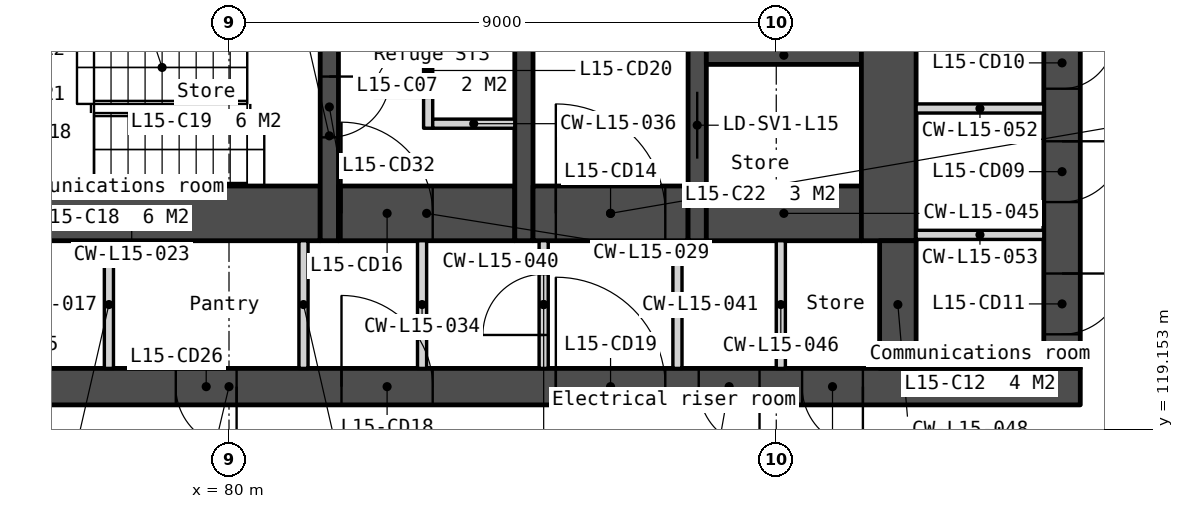
"""IFC4 building model, lengths in metres.
Left out: names, types, materials, properties, quantities, classifications, styles, units other than length and angle.
Written with IfcOpenShell. Run it as: python <this file> out.ifc"""

import sys

from ifc_helpers import new_model, si_unit, direction, frame, frame_2d, origin, place, context, subcontext, project, spatial, polyline, rectangle, outline, extrude, element, fill, save


model = new_model("IFC4")
c1 = context("Model", 3, precision=1e-05, world=origin(), true_north=direction((0.0, 1.0)))
c2 = subcontext(c1, "Body", "Model", "MODEL_VIEW")
j1 = project(units=[si_unit("LENGTHUNIT", "METRE"), si_unit("PLANEANGLEUNIT", "RADIAN")], contexts=[c1])
p1 = place(None, origin())
s1 = spatial("IfcSite", under=j1, at=p1, CompositionType="ELEMENT")
p2 = place(p1, origin())
s2 = spatial("IfcBuilding", under=s1, at=p2, CompositionType="ELEMENT")
p3 = place(p2, frame((0.0, 0.0, 66.5)))
s3 = spatial("IfcBuildingStorey", under=s2, at=p3, CompositionType="ELEMENT", Elevation=66.5)
p4 = place(p3, frame((66.0, 119.85, 0.0), z_axis=(0.0, 0.0, 1.0), x_axis=(1.0, 0.0, 0.0)))
e1 = element("IfcWall", 1, at=p4, inside=s3, PredefinedType="SOLIDWALL", context=c2, shape_type="SweptSolid", body=[
    extrude(rectangle(XDim=28.0, YDim=0.6, at=frame_2d((14.0, 0.0))), origin(), (0.0, 0.0, 1.0), 3.35),
])
p5 = place(p4, frame((6.825, 0.0, 0.0)))
e2 = element("IfcOpeningElement", 2, at=p5, cuts=e1, PredefinedType="OPENING", context=c2, shape_type="SweptSolid", body=[
    extrude(rectangle(XDim=1.8, YDim=2.1, at=frame_2d((0.9, 1.05))), frame((0.0, 0.31, 0.0), z_axis=(0.0, -1.0, 0.0), x_axis=(1.0, 0.0, 0.0)), (0.0, 0.0, 1.0), 0.62),
])
p6 = place(p4, frame((15.85, 0.0, 0.0)))
e3 = element("IfcOpeningElement", 3, at=p6, cuts=e1, PredefinedType="OPENING", context=c2, shape_type="SweptSolid", body=[
    extrude(rectangle(XDim=1.5, YDim=2.1, at=frame_2d((0.75, 1.05))), frame((0.0, 0.31, 0.0), z_axis=(0.0, -1.0, 0.0), x_axis=(1.0, 0.0, 0.0)), (0.0, 0.0, 1.0), 0.62),
])
p7 = place(p4, frame((19.375, 0.0, 0.0)))
e4 = element("IfcOpeningElement", 4, at=p7, cuts=e1, PredefinedType="OPENING", context=c2, shape_type="SweptSolid", body=[
    extrude(rectangle(XDim=1.8, YDim=2.1, at=frame_2d((0.9, 1.05))), frame((0.0, 0.31, 0.0), z_axis=(0.0, -1.0, 0.0), x_axis=(1.0, 0.0, 0.0)), (0.0, 0.0, 1.0), 0.62),
])
p8 = place(p4, frame((4.425, 0.0, 0.0)))
e5 = element("IfcOpeningElement", 5, at=p8, cuts=e1, PredefinedType="OPENING", context=c2, shape_type="SweptSolid", body=[
    extrude(rectangle(XDim=1.0, YDim=2.1, at=frame_2d((0.5, 1.05))), frame((0.0, 0.31, 0.0), z_axis=(0.0, -1.0, 0.0), x_axis=(1.0, 0.0, 0.0)), (0.0, 0.0, 1.0), 0.62),
])
p9 = place(p4, frame((9.925, 0.0, 0.0)))
e6 = element("IfcOpeningElement", 6, at=p9, cuts=e1, PredefinedType="OPENING", context=c2, shape_type="SweptSolid", body=[
    extrude(rectangle(XDim=1.0, YDim=2.1, at=frame_2d((0.5, 1.05))), frame((0.0, 0.31, 0.0), z_axis=(0.0, -1.0, 0.0), x_axis=(1.0, 0.0, 0.0)), (0.0, 0.0, 1.0), 0.62),
])
p10 = place(p4, frame((13.125, 0.0, 0.0)))
e7 = element("IfcOpeningElement", 7, at=p10, cuts=e1, PredefinedType="OPENING", context=c2, shape_type="SweptSolid", body=[
    extrude(rectangle(XDim=1.0, YDim=2.1, at=frame_2d((0.5, 1.05))), frame((0.0, 0.31, 0.0), z_axis=(0.0, -1.0, 0.0), x_axis=(1.0, 0.0, 0.0)), (0.0, 0.0, 1.0), 0.62),
])
p11 = place(p4, frame((21.725, 0.0, 0.0)))
e8 = element("IfcOpeningElement", 8, at=p11, cuts=e1, PredefinedType="OPENING", context=c2, shape_type="SweptSolid", body=[
    extrude(rectangle(XDim=1.0, YDim=2.1, at=frame_2d((0.5, 1.05))), frame((0.0, 0.31, 0.0), z_axis=(0.0, -1.0, 0.0), x_axis=(1.0, 0.0, 0.0)), (0.0, 0.0, 1.0), 0.62),
])
p12 = place(p4, frame((23.425, 0.0, 0.0)))
e9 = element("IfcOpeningElement", 9, at=p12, cuts=e1, PredefinedType="OPENING", context=c2, shape_type="SweptSolid", body=[
    extrude(rectangle(XDim=1.0, YDim=2.1, at=frame_2d((0.5, 1.05))), frame((0.0, 0.31, 0.0), z_axis=(0.0, -1.0, 0.0), x_axis=(1.0, 0.0, 0.0)), (0.0, 0.0, 1.0), 0.62),
])
p13 = place(p3, frame((75.3, 122.7, 0.0), z_axis=(0.0, 0.0, 1.0), x_axis=(1.0, 0.0, 0.0)))
e10 = element("IfcWall", 10, at=p13, inside=s3, PredefinedType="SOLIDWALL", context=c2, shape_type="SweptSolid", body=[
    extrude(rectangle(XDim=6.2, YDim=0.9, at=frame_2d((3.1, 0.0))), origin(), (0.0, 0.0, 1.0), 3.35),
])
for number, where, z_axis, x_axis in (
    (11, (78.025, 122.25, 0.0), (0.0, 0.0, 1.0), (0.0, -1.0, 0.0)),
    (12, (81.225, 122.25, 0.0), (0.0, 0.0, 1.0), (0.0, -1.0, 0.0)),
):
    element("IfcWall", number, at=place(p3, frame(where, z_axis=z_axis, x_axis=x_axis)), inside=s3, PredefinedType="PARTITIONING", context=c2, shape_type="SweptSolid", body=[
        extrude(rectangle(XDim=2.1, YDim=0.15, at=frame_2d((1.05, 0.0))), origin(), (0.0, 0.0, 1.0), 3.35),
    ])
p14 = place(p3, frame((81.65, 125.7, 0.0), z_axis=(0.0, 0.0, 1.0), x_axis=(0.0, -1.0, 0.0)))
e13 = element("IfcWall", 13, at=p14, inside=s3, PredefinedType="SOLIDWALL", context=c2, shape_type="SweptSolid", body=[
    extrude(rectangle(XDim=3.45, YDim=0.3, at=frame_2d((1.725, 0.0))), origin(), (0.0, 0.0, 1.0), 3.35),
])
p15 = place(p14, frame((0.75, 0.0, 0.0)))
e14 = element("IfcOpeningElement", 14, at=p15, cuts=e13, PredefinedType="OPENING", context=c2, shape_type="SweptSolid", body=[
    extrude(rectangle(XDim=1.0, YDim=2.1, at=frame_2d((0.5, 1.05))), frame((0.0, 0.16, 0.0), z_axis=(0.0, -1.0, 0.0), x_axis=(1.0, 0.0, 0.0)), (0.0, 0.0, 1.0), 0.32),
])
p16 = place(p3, frame((81.8, 122.7, 0.0), z_axis=(0.0, 0.0, 1.0), x_axis=(1.0, 0.0, 0.0)))
e15 = element("IfcWall", 15, at=p16, inside=s3, PredefinedType="SOLIDWALL", context=c2, shape_type="SweptSolid", body=[
    extrude(rectangle(XDim=2.9, YDim=0.9, at=frame_2d((1.45, 0.0))), origin(), (0.0, 0.0, 1.0), 3.35),
])
p17 = place(p16, frame((0.05, 0.0, 0.0)))
e16 = element("IfcOpeningElement", 16, at=p17, cuts=e15, PredefinedType="OPENING", context=c2, shape_type="SweptSolid", body=[
    extrude(rectangle(XDim=1.5, YDim=2.1, at=frame_2d((0.75, 1.05))), frame((0.0, 0.46, 0.0), z_axis=(0.0, -1.0, 0.0), x_axis=(1.0, 0.0, 0.0)), (0.0, 0.0, 1.0), 0.92),
])
p18 = place(p3, frame((83.175, 122.25, 0.0), z_axis=(0.0, 0.0, 1.0), x_axis=(0.0, -1.0, 0.0)))
e17 = element("IfcWall", 17, at=p18, inside=s3, PredefinedType="PARTITIONING", context=c2, shape_type="SweptSolid", body=[
    extrude(rectangle(XDim=2.1, YDim=0.15, at=frame_2d((1.05, 0.0))), origin(), (0.0, 0.0, 1.0), 3.35),
])
p19 = place(p3, frame((83.275, 125.85, 0.0), z_axis=(0.0, 0.0, 1.0), x_axis=(0.0, -1.0, 0.0)))
e18 = element("IfcWall", 18, at=p19, inside=s3, PredefinedType="PARTITIONING", context=c2, shape_type="SweptSolid", body=[
    extrude(rectangle(XDim=1.75, YDim=0.15, at=frame_2d((0.875, 0.0))), origin(), (0.0, 0.0, 1.0), 3.35),
])
p20 = place(p19, frame((0.35, 0.0, 0.0)))
e19 = element("IfcOpeningElement", 19, at=p20, cuts=e18, PredefinedType="OPENING", context=c2, shape_type="SweptSolid", body=[
    extrude(rectangle(XDim=0.9, YDim=2.1, at=frame_2d((0.45, 1.05))), frame((0.0, 0.085, 0.0), z_axis=(0.0, -1.0, 0.0), x_axis=(1.0, 0.0, 0.0)), (0.0, 0.0, 1.0), 0.17),
])
p21 = place(p3, frame((83.35, 124.175, 0.0), z_axis=(0.0, 0.0, 1.0), x_axis=(1.0, 0.0, 0.0)))
e20 = element("IfcWall", 20, at=p21, inside=s3, PredefinedType="PARTITIONING", context=c2, shape_type="SweptSolid", body=[
    extrude(rectangle(XDim=1.35, YDim=0.15, at=frame_2d((0.675, 0.0))), origin(), (0.0, 0.0, 1.0), 3.35),
])
p22 = place(p3, frame((84.85, 133.95, 0.0), z_axis=(0.0, 0.0, 1.0), x_axis=(0.0, -1.0, 0.0)))
e21 = element("IfcWall", 21, at=p22, inside=s3, PredefinedType="SOLIDWALL", context=c2, shape_type="SweptSolid", body=[
    extrude(rectangle(XDim=11.7, YDim=0.3, at=frame_2d((5.85, 0.0))), origin(), (0.0, 0.0, 1.0), 3.35),
])
p23 = place(p3, frame((85.0, 122.7, 0.0), z_axis=(0.0, 0.0, 1.0), x_axis=(1.0, 0.0, 0.0)))
e22 = element("IfcWall", 22, at=p23, inside=s3, PredefinedType="SOLIDWALL", context=c2, shape_type="SweptSolid", body=[
    extrude(rectangle(XDim=2.55, YDim=0.9, at=frame_2d((1.275, 0.0))), origin(), (0.0, 0.0, 1.0), 3.35),
])
p24 = place(p23, frame((0.375, 0.0, 0.0)))
e23 = element("IfcOpeningElement", 23, at=p24, cuts=e22, PredefinedType="OPENING", context=c2, shape_type="SweptSolid", body=[
    extrude(rectangle(XDim=1.8, YDim=2.1, at=frame_2d((0.9, 1.05))), frame((0.0, 0.46, 0.0), z_axis=(0.0, -1.0, 0.0), x_axis=(1.0, 0.0, 0.0)), (0.0, 0.0, 1.0), 0.92),
])
p25 = place(p3, frame((85.175, 122.25, 0.0), z_axis=(0.0, 0.0, 1.0), x_axis=(0.0, -1.0, 0.0)))
e24 = element("IfcWall", 24, at=p25, inside=s3, PredefinedType="PARTITIONING", context=c2, shape_type="SweptSolid", body=[
    extrude(rectangle(XDim=2.1, YDim=0.15, at=frame_2d((1.05, 0.0))), origin(), (0.0, 0.0, 1.0), 3.35),
])
p26 = place(p25, frame((0.55, 0.0, 0.0)))
e25 = element("IfcOpeningElement", 25, at=p26, cuts=e24, PredefinedType="OPENING", context=c2, shape_type="SweptSolid", body=[
    extrude(rectangle(XDim=1.0, YDim=2.1, at=frame_2d((0.5, 1.05))), frame((0.0, 0.085, 0.0), z_axis=(0.0, -1.0, 0.0), x_axis=(1.0, 0.0, 0.0)), (0.0, 0.0, 1.0), 0.17),
])
p27 = place(p3, frame((87.375, 122.25, 0.0), z_axis=(0.0, 0.0, 1.0), x_axis=(0.0, -1.0, 0.0)))
e26 = element("IfcWall", 26, at=p27, inside=s3, PredefinedType="PARTITIONING", context=c2, shape_type="SweptSolid", body=[
    extrude(rectangle(XDim=2.1, YDim=0.15, at=frame_2d((1.05, 0.0))), origin(), (0.0, 0.0, 1.0), 3.35),
])
p28 = place(p3, frame((87.7, 133.95, 0.0), z_axis=(0.0, 0.0, 1.0), x_axis=(0.0, -1.0, 0.0)))
e27 = element("IfcWall", 27, at=p28, inside=s3, PredefinedType="SOLIDWALL", context=c2, shape_type="SweptSolid", body=[
    extrude(rectangle(XDim=11.7, YDim=0.3, at=frame_2d((5.85, 0.0))), origin(), (0.0, 0.0, 1.0), 3.35),
])
p29 = place(p28, frame((6.95, 0.0, 0.0)))
e28 = element("IfcOpeningElement", 28, at=p29, cuts=e27, PredefinedType="OPENING", context=c2, shape_type="SweptSolid", body=[
    extrude(rectangle(XDim=1.1, YDim=2.1, at=frame_2d((0.55, 1.05))), frame((0.0, 0.16, 0.0), z_axis=(0.0, -1.0, 0.0), x_axis=(1.0, 0.0, 0.0)), (0.0, 0.0, 1.0), 0.32),
])
p30 = place(p28, frame((5.1, 0.0, 0.0)))
e29 = element("IfcOpeningElement", 29, at=p30, cuts=e27, PredefinedType="OPENING", context=c2, shape_type="SweptSolid", body=[
    extrude(rectangle(XDim=1.0, YDim=2.1, at=frame_2d((0.5, 1.05))), frame((0.0, 0.16, 0.0), z_axis=(0.0, -1.0, 0.0), x_axis=(1.0, 0.0, 0.0)), (0.0, 0.0, 1.0), 0.32),
])
p31 = place(p28, frame((9.25, 0.0, 0.0)))
e30 = element("IfcOpeningElement", 30, at=p31, cuts=e27, PredefinedType="OPENING", context=c2, shape_type="SweptSolid", body=[
    extrude(rectangle(XDim=1.1, YDim=2.1, at=frame_2d((0.55, 1.05))), frame((0.0, 0.16, 0.0), z_axis=(0.0, -1.0, 0.0), x_axis=(1.0, 0.0, 0.0)), (0.0, 0.0, 1.0), 0.32),
])
p32 = place(p3, frame((87.85, 125.3, 0.0), z_axis=(0.0, 0.0, 1.0), x_axis=(1.0, 0.0, 0.0)))
e31 = element("IfcWall", 31, at=p32, inside=s3, PredefinedType="SOLIDWALL", context=c2, shape_type="SweptSolid", body=[
    extrude(rectangle(XDim=2.55, YDim=0.3, at=frame_2d((1.275, 0.0))), origin(), (0.0, 0.0, 1.0), 3.35),
])
p33 = place(p3, frame((87.85, 122.7, 0.0), z_axis=(0.0, 0.0, 1.0), x_axis=(1.0, 0.0, 0.0)))
e32 = element("IfcWall", 32, at=p33, inside=s3, PredefinedType="SOLIDWALL", context=c2, shape_type="SweptSolid", body=[
    extrude(rectangle(XDim=2.55, YDim=0.9, at=frame_2d((1.275, 0.0))), origin(), (0.0, 0.0, 1.0), 3.35),
])
p34 = place(p3, frame((89.075, 122.25, 0.0), z_axis=(0.0, 0.0, 1.0), x_axis=(0.0, -1.0, 0.0)))
e33 = element("IfcWall", 33, at=p34, inside=s3, PredefinedType="PARTITIONING", context=c2, shape_type="SweptSolid", body=[
    extrude(rectangle(XDim=2.1, YDim=0.15, at=frame_2d((1.05, 0.0))), origin(), (0.0, 0.0, 1.0), 3.35),
])
p35 = place(p3, frame((90.85, 133.95, 0.0), z_axis=(0.0, 0.0, 1.0), x_axis=(0.0, -1.0, 0.0)))
e34 = element("IfcWall", 34, at=p35, inside=s3, PredefinedType="SOLIDWALL", context=c2, shape_type="SweptSolid", body=[
    extrude(rectangle(XDim=11.7, YDim=0.9, at=frame_2d((5.85, 0.0))), origin(), (0.0, 0.0, 1.0), 3.35),
])
p36 = place(p3, frame((91.0, 122.25, 0.0), z_axis=(0.0, 0.0, 1.0), x_axis=(0.0, -1.0, 0.0)))
e35 = element("IfcWall", 35, at=p36, inside=s3, PredefinedType="SOLIDWALL", context=c2, shape_type="SweptSolid", body=[
    extrude(rectangle(XDim=2.1, YDim=0.6, at=frame_2d((1.05, 0.0))), origin(), (0.0, 0.0, 1.0), 3.35),
])
for number, where, z_axis, x_axis in (
    (36, (91.3, 124.425, 0.0), (0.0, 0.0, 1.0), (1.0, 0.0, 0.0)),
    (37, (91.3, 122.346, 0.0), (0.0, 0.0, 1.0), (1.0, 0.0, 0.0)),
):
    element("IfcWall", number, at=place(p3, frame(where, z_axis=z_axis, x_axis=x_axis)), inside=s3, PredefinedType="PARTITIONING", context=c2, shape_type="SweptSolid", body=[
        extrude(rectangle(XDim=2.1, YDim=0.15, at=frame_2d((1.05, 0.0))), origin(), (0.0, 0.0, 1.0), 3.35),
    ])
p37 = place(p3, frame((93.7, 133.95, 0.0), z_axis=(0.0, 0.0, 1.0), x_axis=(0.0, -1.0, 0.0)))
e38 = element("IfcWall", 38, at=p37, inside=s3, PredefinedType="SOLIDWALL", context=c2, shape_type="SweptSolid", body=[
    extrude(rectangle(XDim=13.8, YDim=0.6, at=frame_2d((6.9, 0.0))), origin(), (0.0, 0.0, 1.0), 3.35),
])
p38 = place(p37, frame((0.6, 0.0, 0.0)))
e39 = element("IfcOpeningElement", 39, at=p38, cuts=e38, PredefinedType="OPENING", context=c2, shape_type="SweptSolid", body=[
    extrude(rectangle(XDim=1.1, YDim=2.1, at=frame_2d((0.55, 1.05))), frame((0.0, 0.31, 0.0), z_axis=(0.0, -1.0, 0.0), x_axis=(1.0, 0.0, 0.0)), (0.0, 0.0, 1.0), 0.62),
])
p39 = place(p37, frame((10.064, 0.0, 0.0)))
e40 = element("IfcOpeningElement", 40, at=p39, cuts=e38, PredefinedType="OPENING", context=c2, shape_type="SweptSolid", body=[
    extrude(rectangle(XDim=1.0, YDim=2.1, at=frame_2d((0.5, 1.05))), frame((0.0, 0.31, 0.0), z_axis=(0.0, -1.0, 0.0), x_axis=(1.0, 0.0, 0.0)), (0.0, 0.0, 1.0), 0.62),
])
p40 = place(p37, frame((8.35, 0.0, 0.0)))
e41 = element("IfcOpeningElement", 41, at=p40, cuts=e38, PredefinedType="OPENING", context=c2, shape_type="SweptSolid", body=[
    extrude(rectangle(XDim=0.85, YDim=2.1, at=frame_2d((0.425, 1.05))), frame((0.0, 0.31, 0.0), z_axis=(0.0, -1.0, 0.0), x_axis=(1.0, 0.0, 0.0)), (0.0, 0.0, 1.0), 0.62),
])
p41 = place(p37, frame((12.239, 0.0, 0.0)))
e42 = element("IfcOpeningElement", 42, at=p41, cuts=e38, PredefinedType="OPENING", context=c2, shape_type="SweptSolid", body=[
    extrude(rectangle(XDim=1.0, YDim=2.1, at=frame_2d((0.5, 1.05))), frame((0.0, 0.31, 0.0), z_axis=(0.0, -1.0, 0.0), x_axis=(1.0, 0.0, 0.0)), (0.0, 0.0, 1.0), 0.62),
])
p42 = place(p3, frame((88.435, 99.831, -0.15), z_axis=(0.0, 0.0, 1.0), x_axis=(0.500000806382, 0.866024938219, 0.0)))
e43 = element("IfcWall", 43, at=p42, inside=s3, PredefinedType="SOLIDWALL", context=c2, shape_type="SweptSolid", body=[
    extrude(outline(polyline([(34.14, 3.5), (34.14, 0.0), (0.0, 0.0), (0.0, 3.5), (34.14, 3.5)])), frame((0.0, 0.225, 0.0), z_axis=(0.0, -1.0, 0.0), x_axis=(1.0, 0.0, 0.0)), (0.0, 0.0, 1.0), 0.45),
])
p43 = place(p42, frame((5.81, 0.0, 1.05)))
e44 = element("IfcOpeningElement", 44, at=p43, cuts=e43, PredefinedType="OPENING", context=c2, shape_type="SweptSolid", body=[
    extrude(rectangle(XDim=1.2, YDim=1.5, at=frame_2d((0.6, 0.75))), frame((0.0, 0.235, 0.0), z_axis=(0.0, -1.0, 0.0), x_axis=(1.0, 0.0, 0.0)), (0.0, 0.0, 1.0), 0.47),
])
p44 = place(p42, frame((7.51, 0.0, 1.05)))
e45 = element("IfcOpeningElement", 45, at=p44, cuts=e43, PredefinedType="OPENING", context=c2, shape_type="SweptSolid", body=[
    extrude(rectangle(XDim=1.2, YDim=1.5, at=frame_2d((0.6, 0.75))), frame((0.0, 0.235, 0.0), z_axis=(0.0, -1.0, 0.0), x_axis=(1.0, 0.0, 0.0)), (0.0, 0.0, 1.0), 0.47),
])
p45 = place(p42, frame((14.77, 0.0, 1.05)))
e46 = element("IfcOpeningElement", 46, at=p45, cuts=e43, PredefinedType="OPENING", context=c2, shape_type="SweptSolid", body=[
    extrude(rectangle(XDim=1.2, YDim=1.5, at=frame_2d((0.6, 0.75))), frame((0.0, 0.235, 0.0), z_axis=(0.0, -1.0, 0.0), x_axis=(1.0, 0.0, 0.0)), (0.0, 0.0, 1.0), 0.47),
])
p46 = place(p42, frame((16.47, 0.0, 1.05)))
e47 = element("IfcOpeningElement", 47, at=p46, cuts=e43, PredefinedType="OPENING", context=c2, shape_type="SweptSolid", body=[
    extrude(rectangle(XDim=1.2, YDim=1.5, at=frame_2d((0.6, 0.75))), frame((0.0, 0.235, 0.0), z_axis=(0.0, -1.0, 0.0), x_axis=(1.0, 0.0, 0.0)), (0.0, 0.0, 1.0), 0.47),
])
p47 = place(p42, frame((23.73, 0.0, 1.05)))
e48 = element("IfcOpeningElement", 48, at=p47, cuts=e43, PredefinedType="OPENING", context=c2, shape_type="SweptSolid", body=[
    extrude(rectangle(XDim=1.2, YDim=1.5, at=frame_2d((0.6, 0.75))), frame((0.0, 0.235, 0.0), z_axis=(0.0, -1.0, 0.0), x_axis=(1.0, 0.0, 0.0)), (0.0, 0.0, 1.0), 0.47),
])
p48 = place(p42, frame((25.43, 0.0, 1.05)))
e49 = element("IfcOpeningElement", 49, at=p48, cuts=e43, PredefinedType="OPENING", context=c2, shape_type="SweptSolid", body=[
    extrude(rectangle(XDim=1.2, YDim=1.5, at=frame_2d((0.6, 0.75))), frame((0.0, 0.235, 0.0), z_axis=(0.0, -1.0, 0.0), x_axis=(1.0, 0.0, 0.0)), (0.0, 0.0, 1.0), 0.47),
])
p49 = place(p42, frame((32.218, 0.0, 1.05)))
e50 = element("IfcOpeningElement", 50, at=p49, cuts=e43, PredefinedType="OPENING", context=c2, shape_type="SweptSolid", body=[
    extrude(rectangle(XDim=1.2, YDim=1.5, at=frame_2d((0.6, 0.75))), frame((0.0, 0.235, 0.0), z_axis=(0.0, -1.0, 0.0), x_axis=(1.0, 0.0, 0.0)), (0.0, 0.0, 1.0), 0.47),
])
p50 = place(p39, origin())
e51 = element("IfcDoor", 51, at=p50, inside=s3, OperationType="SINGLE_SWING_LEFT", PredefinedType="DOOR", context=c2, shape_type="SweptSolid", body=[
    extrude(rectangle(XDim=1.0, YDim=2.1, at=frame_2d((0.5, 1.05))), frame((0.0, 0.025, 0.0), z_axis=(0.0, -1.0, 0.0), x_axis=(1.0, 0.0, 0.0)), (0.0, 0.0, 1.0), 0.05),
])
fill(e40, e51)
p51 = place(p40, origin())
e52 = element("IfcDoor", 52, at=p51, inside=s3, OperationType="SINGLE_SWING_LEFT", PredefinedType="DOOR", context=c2, shape_type="SweptSolid", body=[
    extrude(rectangle(XDim=0.85, YDim=2.1, at=frame_2d((0.425, 1.05))), frame((0.0, 0.025, 0.0), z_axis=(0.0, -1.0, 0.0), x_axis=(1.0, 0.0, 0.0)), (0.0, 0.0, 1.0), 0.05),
])
fill(e41, e52)
p52 = place(p41, origin())
e53 = element("IfcDoor", 53, at=p52, inside=s3, OperationType="SINGLE_SWING_LEFT", PredefinedType="DOOR", context=c2, shape_type="SweptSolid", body=[
    extrude(rectangle(XDim=1.0, YDim=2.1, at=frame_2d((0.5, 1.05))), frame((0.0, 0.025, 0.0), z_axis=(0.0, -1.0, 0.0), x_axis=(1.0, 0.0, 0.0)), (0.0, 0.0, 1.0), 0.05),
])
fill(e42, e53)
p53 = place(p24, origin())
e54 = element("IfcDoor", 54, at=p53, inside=s3, OperationType="DOUBLE_DOOR_DOUBLE_SWING", PredefinedType="DOOR", context=c2, shape_type="SweptSolid", body=[
    extrude(rectangle(XDim=1.8, YDim=2.1, at=frame_2d((0.9, 1.05))), frame((0.0, 0.025, 0.0), z_axis=(0.0, -1.0, 0.0), x_axis=(1.0, 0.0, 0.0)), (0.0, 0.0, 1.0), 0.05),
])
fill(e23, e54)
p54 = place(p17, origin())
e55 = element("IfcDoor", 55, at=p54, inside=s3, OperationType="DOUBLE_DOOR_DOUBLE_SWING", PredefinedType="DOOR", context=c2, shape_type="SweptSolid", body=[
    extrude(rectangle(XDim=1.5, YDim=2.1, at=frame_2d((0.75, 1.05))), frame((0.0, 0.025, 0.0), z_axis=(0.0, -1.0, 0.0), x_axis=(1.0, 0.0, 0.0)), (0.0, 0.0, 1.0), 0.05),
])
fill(e16, e55)
p55 = place(p6, origin())
e56 = element("IfcDoor", 56, at=p55, inside=s3, OperationType="DOUBLE_DOOR_DOUBLE_SWING", PredefinedType="DOOR", context=c2, shape_type="SweptSolid", body=[
    extrude(rectangle(XDim=1.5, YDim=2.1, at=frame_2d((0.75, 1.05))), frame((0.0, 0.025, 0.0), z_axis=(0.0, -1.0, 0.0), x_axis=(1.0, 0.0, 0.0)), (0.0, 0.0, 1.0), 0.05),
])
fill(e3, e56)
p56 = place(p7, origin())
e57 = element("IfcDoor", 57, at=p56, inside=s3, OperationType="DOUBLE_DOOR_DOUBLE_SWING", PredefinedType="DOOR", context=c2, shape_type="SweptSolid", body=[
    extrude(rectangle(XDim=1.8, YDim=2.1, at=frame_2d((0.9, 1.05))), frame((0.0, 0.025, 0.0), z_axis=(0.0, -1.0, 0.0), x_axis=(1.0, 0.0, 0.0)), (0.0, 0.0, 1.0), 0.05),
])
fill(e4, e57)
p57 = place(p20, origin())
e58 = element("IfcDoor", 58, at=p57, inside=s3, OperationType="SINGLE_SWING_RIGHT", PredefinedType="DOOR", context=c2, shape_type="SweptSolid", body=[
    extrude(rectangle(XDim=0.9, YDim=2.1, at=frame_2d((0.45, 1.05))), frame((0.0, 0.025, 0.0), z_axis=(0.0, -1.0, 0.0), x_axis=(1.0, 0.0, 0.0)), (0.0, 0.0, 1.0), 0.05),
])
fill(e19, e58)
p58 = place(p10, origin())
e59 = element("IfcDoor", 59, at=p58, inside=s3, OperationType="SINGLE_SWING_RIGHT", PredefinedType="DOOR", context=c2, shape_type="SweptSolid", body=[
    extrude(rectangle(XDim=1.0, YDim=2.1, at=frame_2d((0.5, 1.05))), frame((0.0, 0.025, 0.0), z_axis=(0.0, -1.0, 0.0), x_axis=(1.0, 0.0, 0.0)), (0.0, 0.0, 1.0), 0.05),
])
fill(e7, e59)
p59 = place(p26, origin())
e60 = element("IfcDoor", 60, at=p59, inside=s3, OperationType="SINGLE_SWING_RIGHT", PredefinedType="DOOR", context=c2, shape_type="SweptSolid", body=[
    extrude(rectangle(XDim=1.0, YDim=2.1, at=frame_2d((0.5, 1.05))), frame((0.0, 0.025, 0.0), z_axis=(0.0, -1.0, 0.0), x_axis=(1.0, 0.0, 0.0)), (0.0, 0.0, 1.0), 0.05),
])
fill(e25, e60)
p60 = place(p11, origin())
e61 = element("IfcDoor", 61, at=p60, inside=s3, OperationType="SINGLE_SWING_RIGHT", PredefinedType="DOOR", context=c2, shape_type="SweptSolid", body=[
    extrude(rectangle(XDim=1.0, YDim=2.1, at=frame_2d((0.5, 1.05))), frame((0.0, 0.025, 0.0), z_axis=(0.0, -1.0, 0.0), x_axis=(1.0, 0.0, 0.0)), (0.0, 0.0, 1.0), 0.05),
])
fill(e8, e61)
p61 = place(p12, origin())
e62 = element("IfcDoor", 62, at=p61, inside=s3, OperationType="SINGLE_SWING_RIGHT", PredefinedType="DOOR", context=c2, shape_type="SweptSolid", body=[
    extrude(rectangle(XDim=1.0, YDim=2.1, at=frame_2d((0.5, 1.05))), frame((0.0, 0.025, 0.0), z_axis=(0.0, -1.0, 0.0), x_axis=(1.0, 0.0, 0.0)), (0.0, 0.0, 1.0), 0.05),
])
fill(e9, e62)
p62 = place(p15, origin())
e63 = element("IfcDoor", 63, at=p62, inside=s3, OperationType="SINGLE_SWING_LEFT", PredefinedType="DOOR", context=c2, shape_type="SweptSolid", body=[
    extrude(rectangle(XDim=1.0, YDim=2.1, at=frame_2d((0.5, 1.05))), frame((0.0, 0.025, 0.0), z_axis=(0.0, -1.0, 0.0), x_axis=(1.0, 0.0, 0.0)), (0.0, 0.0, 1.0), 0.05),
])
fill(e14, e63)
p63 = place(p31, origin())
e64 = element("IfcDoor", 64, at=p63, inside=s3, OperationType="SLIDING_TO_LEFT", PredefinedType="DOOR", context=c2, shape_type="SweptSolid", body=[
    extrude(rectangle(XDim=1.1, YDim=2.1, at=frame_2d((0.55, 1.05))), frame((0.0, 0.025, 0.0), z_axis=(0.0, -1.0, 0.0), x_axis=(1.0, 0.0, 0.0)), (0.0, 0.0, 1.0), 0.05),
])
fill(e30, e64)
save(model, sys.argv[1])
